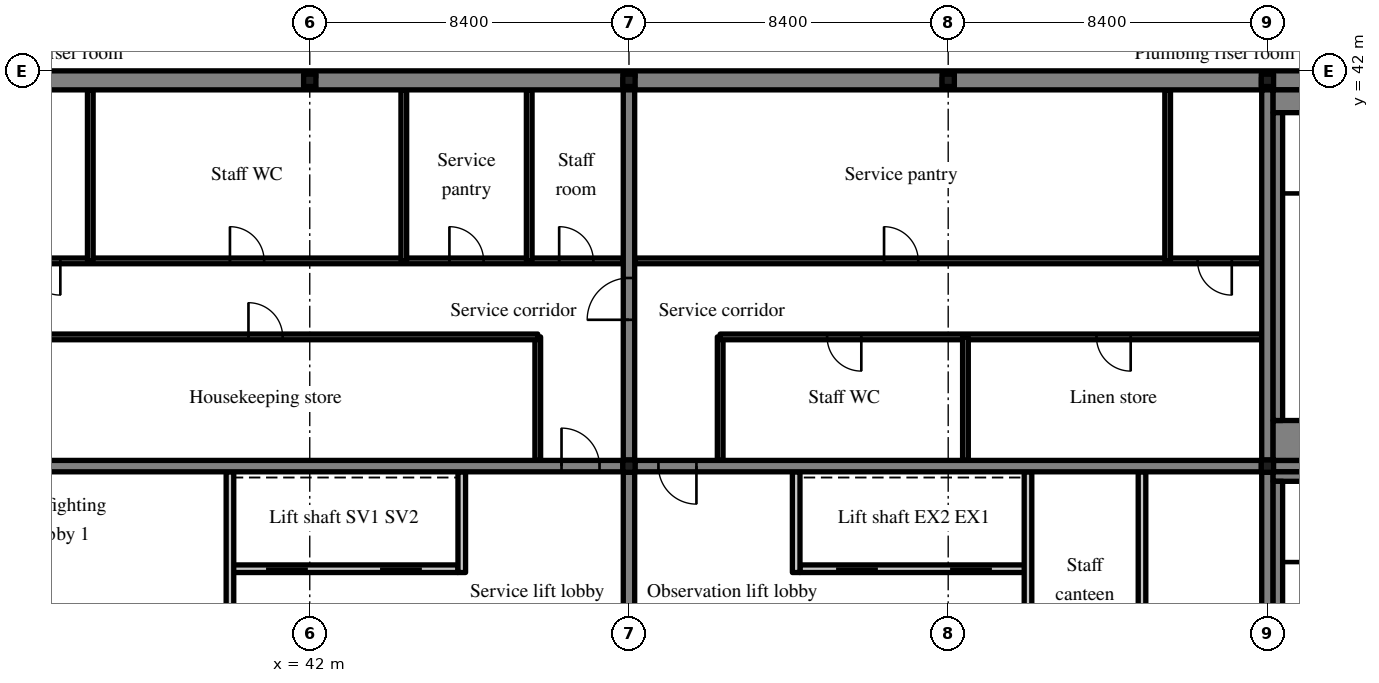
"""IFC4 building model, lengths in metres.
Left out: names, types, materials, properties, quantities, classifications, styles, units other than length and angle.
Written with IfcOpenShell. Run it as: python <this file> out.ifc"""

import sys

from ifc_helpers import new_model, si_unit, direction, frame, frame_2d, origin, origin_2d, place, context, subcontext, project, spatial, rectangle, hollow_circle, extrude, source, transform, mapped, element, fill, save


model = new_model("IFC4")
c1 = context("Model", 3, precision=1e-05, world=origin(), true_north=direction((0.0, 1.0)))
c2 = subcontext(c1, "Body", "Model", "MODEL_VIEW")
j1 = project(units=[si_unit("LENGTHUNIT", "METRE"), si_unit("PLANEANGLEUNIT", "RADIAN")], contexts=[c1])
p1 = place(None, origin())
s1 = spatial("IfcSite", under=j1, at=p1, CompositionType="ELEMENT")
p2 = place(p1, origin())
s2 = spatial("IfcBuilding", under=s1, at=p2, CompositionType="ELEMENT")
p3 = place(p2, frame((0.0, 0.0, 329.7)))
s3 = spatial("IfcBuildingStorey", under=s2, at=p3, CompositionType="ELEMENT", Elevation=329.7)
m1 = source(origin(), c2, "Body", "SweptSolid", [
    extrude(rectangle(XDim=50.4, YDim=0.5, at=frame_2d((25.2, 0.0))), origin(), (0.0, 0.0, 1.0), 4.72),
])
p4 = place(p3, frame((25.2, 41.75, 0.0), z_axis=(0.0, 0.0, 1.0), x_axis=(1.0, 0.0, 0.0)))
e1 = element("IfcWall", 1, at=p4, inside=s3, PredefinedType="SHEAR", context=c2, shape_type="MappedRepresentation", body=[
    mapped(m1, transform((0.0, 0.0, 0.0), scale=1.0)),
])
m2 = source(origin(), c2, "Body", "SweptSolid", [
    extrude(rectangle(XDim=19.0, YDim=0.3, at=frame_2d((9.5, 0.0))), origin(), (0.0, 0.0, 1.0), 4.72),
])
p5 = place(p3, frame((50.4, 22.5, 0.0), z_axis=(0.0, 0.0, 1.0), x_axis=(0.0, 1.0, 0.0)))
e2 = element("IfcWall", 2, at=p5, inside=s3, PredefinedType="SHEAR", context=c2, shape_type="MappedRepresentation", body=[
    mapped(m2, transform((0.0, 0.0, 0.0), scale=1.0)),
])
m3 = source(origin(), c2, "Body", "SweptSolid", [
    extrude(rectangle(XDim=1.1, YDim=2.1, at=frame_2d((0.55, 1.05))), frame((0.0, 0.16, 0.0), z_axis=(0.0, -1.0, 0.0), x_axis=(1.0, 0.0, 0.0)), (0.0, 0.0, 1.0), 0.32),
])
p6 = place(p5, frame((12.95, 0.0, 0.0)))
e3 = element("IfcOpeningElement", 3, at=p6, cuts=e2, PredefinedType="OPENING", context=c2, shape_type="MappedRepresentation", body=[
    mapped(m3, transform((0.0, 0.0, 0.0), scale=1.0)),
])
p7 = place(p3, frame((67.2, 22.5, 0.0), z_axis=(0.0, 0.0, 1.0), x_axis=(0.0, 1.0, 0.0)))
e4 = element("IfcWall", 4, at=p7, inside=s3, PredefinedType="SHEAR", context=c2, shape_type="MappedRepresentation", body=[
    mapped(m2, transform((0.0, 0.0, 0.0), scale=1.0)),
])
m4 = source(origin(), c2, "Body", "SweptSolid", [
    extrude(rectangle(XDim=16.5, YDim=0.3, at=frame_2d((8.25, 0.0))), origin(), (0.0, 0.0, 1.0), 4.72),
])
p8 = place(p3, frame((33.75, 31.6, 0.0), z_axis=(0.0, 0.0, 1.0), x_axis=(1.0, 0.0, 0.0)))
e5 = element("IfcWall", 5, at=p8, inside=s3, PredefinedType="SHEAR", context=c2, shape_type="MappedRepresentation", body=[
    mapped(m4, transform((0.0, 0.0, 0.0), scale=1.0)),
])
m5 = source(origin(), c2, "Body", "SweptSolid", [
    extrude(rectangle(XDim=1.0, YDim=2.1, at=frame_2d((0.5, 1.05))), frame((0.0, 0.16, 0.0), z_axis=(0.0, -1.0, 0.0), x_axis=(1.0, 0.0, 0.0)), (0.0, 0.0, 1.0), 0.32),
])
p9 = place(p8, frame((14.875, 0.0, 0.0)))
e6 = element("IfcOpeningElement", 6, at=p9, cuts=e5, PredefinedType="OPENING", context=c2, shape_type="MappedRepresentation", body=[
    mapped(m5, transform((0.0, 0.0, 0.0), scale=1.0)),
])
p10 = place(p3, frame((50.55, 31.6, 0.0), z_axis=(0.0, 0.0, 1.0), x_axis=(1.0, 0.0, 0.0)))
e7 = element("IfcWall", 7, at=p10, inside=s3, PredefinedType="SHEAR", context=c2, shape_type="MappedRepresentation", body=[
    mapped(m4, transform((0.0, 0.0, 0.0), scale=1.0)),
])
p11 = place(p10, frame((0.625, 0.0, 0.0)))
e8 = element("IfcOpeningElement", 8, at=p11, cuts=e7, PredefinedType="OPENING", context=c2, shape_type="MappedRepresentation", body=[
    mapped(m5, transform((0.0, 0.0, 0.0), scale=1.0)),
])
m6 = source(origin(), c2, "Body", "SweptSolid", [
    extrude(rectangle(XDim=7.75, YDim=0.3, at=frame_2d((3.875, 0.0))), origin(), (0.0, 0.0, 1.0), 4.72),
])
p12 = place(p3, frame((67.35, 31.6, 0.0), z_axis=(0.0, 0.0, 1.0), x_axis=(1.0, 0.0, 0.0)))
e9 = element("IfcWall", 9, at=p12, inside=s3, PredefinedType="SHEAR", context=c2, shape_type="MappedRepresentation", body=[
    mapped(m6, transform((0.0, 0.0, 0.0), scale=1.0)),
])
p13 = place(p12, frame((5.875, 0.0, 0.0)))
e10 = element("IfcOpeningElement", 10, at=p13, cuts=e9, PredefinedType="OPENING", context=c2, shape_type="MappedRepresentation", body=[
    mapped(m3, transform((0.0, 0.0, 0.0), scale=1.0)),
])
m7 = source(origin(), c2, "Body", "SweptSolid", [
    extrude(hollow_circle(Radius=0.162, WallThickness=0.012, at=origin_2d()), origin(), (0.0, 0.0, 1.0), 4.4),
])
for number, where, z_axis, x_axis in (
    (11, (42.0, 41.75, 5.0), (0.0, 0.0, 1.0), (1.0, 0.0, 0.0)),
    (12, (50.4, 41.75, 5.0), (0.0, 0.0, 1.0), (1.0, 0.0, 0.0)),
    (13, (58.8, 41.75, 5.0), (0.0, 0.0, 1.0), (1.0, 0.0, 0.0)),
    (14, (67.2, 41.75, 5.0), (0.0, 0.0, 1.0), (1.0, 0.0, 0.0)),
    (15, (50.4, 31.6, 5.0), (0.0, 0.0, 1.0), (1.0, 0.0, 0.0)),
    (16, (67.2, 31.6, 5.0), (0.0, 0.0, 1.0), (1.0, 0.0, 0.0)),
):
    element("IfcColumn", number, at=place(p3, frame(where, z_axis=z_axis, x_axis=x_axis)), inside=s3, PredefinedType="COLUMN", context=c2, shape_type="MappedRepresentation", body=[
        mapped(m7, transform((0.0, 0.0, 0.0), scale=1.0)),
    ])
m8 = source(origin(), c2, "Body", "SweptSolid", [
    extrude(rectangle(XDim=6.0, YDim=0.2, at=frame_2d((3.0, 0.0))), origin(), (0.0, 0.0, 1.0), 4.72),
])
p14 = place(p3, frame((39.9, 28.9, 0.0), z_axis=(0.0, 0.0, 1.0), x_axis=(1.0, 0.0, 0.0)))
e17 = element("IfcWall", 17, at=p14, inside=s3, PredefinedType="SOLIDWALL", context=c2, shape_type="MappedRepresentation", body=[
    mapped(m8, transform((0.0, 0.0, 0.0), scale=1.0)),
])
m9 = source(origin(), c2, "Body", "SweptSolid", [
    extrude(rectangle(XDim=1.1, YDim=2.1, at=frame_2d((0.55, 1.05))), frame((0.0, 0.11, 0.0), z_axis=(0.0, -1.0, 0.0), x_axis=(1.0, 0.0, 0.0)), (0.0, 0.0, 1.0), 0.22),
])
p15 = place(p14, frame((0.95, 0.0, 0.0)))
e18 = element("IfcOpeningElement", 18, at=p15, cuts=e17, PredefinedType="OPENING", context=c2, shape_type="MappedRepresentation", body=[
    mapped(m9, transform((0.0, 0.0, 0.0), scale=1.0)),
])
p16 = place(p14, frame((3.95, 0.0, 0.0)))
e19 = element("IfcOpeningElement", 19, at=p16, cuts=e17, PredefinedType="OPENING", context=c2, shape_type="MappedRepresentation", body=[
    mapped(m9, transform((0.0, 0.0, 0.0), scale=1.0)),
])
m10 = source(origin(), c2, "Body", "SweptSolid", [
    extrude(rectangle(XDim=8.95, YDim=0.2, at=frame_2d((4.475, 0.0))), origin(), (0.0, 0.0, 1.0), 4.72),
])
p17 = place(p3, frame((39.9, 22.5, 0.0), z_axis=(0.0, 0.0, 1.0), x_axis=(0.0, 1.0, 0.0)))
e20 = element("IfcWall", 20, at=p17, inside=s3, PredefinedType="PARTITIONING", context=c2, shape_type="MappedRepresentation", body=[
    mapped(m10, transform((0.0, 0.0, 0.0), scale=1.0)),
])
m11 = source(origin(), c2, "Body", "SweptSolid", [
    extrude(rectangle(XDim=0.9, YDim=2.1, at=frame_2d((0.45, 1.05))), frame((0.0, 0.11, 0.0), z_axis=(0.0, -1.0, 0.0), x_axis=(1.0, 0.0, 0.0)), (0.0, 0.0, 1.0), 0.22),
])
p18 = place(p17, frame((4.05, 0.0, 0.0)))
e21 = element("IfcOpeningElement", 21, at=p18, cuts=e20, PredefinedType="OPENING", context=c2, shape_type="MappedRepresentation", body=[
    mapped(m11, transform((0.0, 0.0, 0.0), scale=1.0)),
])
m12 = source(origin(), c2, "Body", "SweptSolid", [
    extrude(rectangle(XDim=2.65, YDim=0.2, at=frame_2d((1.325, 0.0))), origin(), (0.0, 0.0, 1.0), 4.72),
])
p19 = place(p3, frame((46.0, 28.8, 0.0), z_axis=(0.0, 0.0, 1.0), x_axis=(0.0, 1.0, 0.0)))
e22 = element("IfcWall", 22, at=p19, inside=s3, PredefinedType="SOLIDWALL", context=c2, shape_type="MappedRepresentation", body=[
    mapped(m12, transform((0.0, 0.0, 0.0), scale=1.0)),
])
m13 = source(origin(), c2, "Body", "SweptSolid", [
    extrude(rectangle(XDim=3.25, YDim=0.15, at=frame_2d((1.625, 0.0))), origin(), (0.0, 0.0, 1.0), 4.72),
])
p20 = place(p3, frame((48.0, 31.75, 0.0), z_axis=(0.0, 0.0, 1.0), x_axis=(0.0, 1.0, 0.0)))
e23 = element("IfcWall", 23, at=p20, inside=s3, PredefinedType="PARTITIONING", context=c2, shape_type="MappedRepresentation", body=[
    mapped(m13, transform((0.0, 0.0, 0.0), scale=1.0)),
])
m14 = source(origin(), c2, "Body", "SweptSolid", [
    extrude(rectangle(XDim=14.25, YDim=0.15, at=frame_2d((7.125, 0.0))), origin(), (0.0, 0.0, 1.0), 4.72),
])
p21 = place(p3, frame((33.75, 35.0, 0.0), z_axis=(0.0, 0.0, 1.0), x_axis=(1.0, 0.0, 0.0)))
e24 = element("IfcWall", 24, at=p21, inside=s3, PredefinedType="PARTITIONING", context=c2, shape_type="MappedRepresentation", body=[
    mapped(m14, transform((0.0, 0.0, 0.0), scale=1.0)),
])
m15 = source(origin(), c2, "Body", "SweptSolid", [
    extrude(rectangle(XDim=0.9, YDim=2.1, at=frame_2d((0.45, 1.05))), frame((0.0, 0.085, 0.0), z_axis=(0.0, -1.0, 0.0), x_axis=(1.0, 0.0, 0.0)), (0.0, 0.0, 1.0), 0.17),
])
p22 = place(p21, frame((6.637, 0.0, 0.0)))
e25 = element("IfcOpeningElement", 25, at=p22, cuts=e24, PredefinedType="OPENING", context=c2, shape_type="MappedRepresentation", body=[
    mapped(m15, transform((0.0, 0.0, 0.0), scale=1.0)),
])
m16 = source(origin(), c2, "Body", "SweptSolid", [
    extrude(rectangle(XDim=16.5, YDim=0.15, at=frame_2d((8.25, 0.0))), origin(), (0.0, 0.0, 1.0), 4.72),
])
p23 = place(p3, frame((33.75, 37.0, 0.0), z_axis=(0.0, 0.0, 1.0), x_axis=(1.0, 0.0, 0.0)))
e26 = element("IfcWall", 26, at=p23, inside=s3, PredefinedType="PARTITIONING", context=c2, shape_type="MappedRepresentation", body=[
    mapped(m16, transform((0.0, 0.0, 0.0), scale=1.0)),
])
p24 = place(p23, frame((0.787, 0.0, 0.0)))
e27 = element("IfcOpeningElement", 27, at=p24, cuts=e26, PredefinedType="OPENING", context=c2, shape_type="MappedRepresentation", body=[
    mapped(m15, transform((0.0, 0.0, 0.0), scale=1.0)),
])
p25 = place(p23, frame((6.15, 0.0, 0.0)))
e28 = element("IfcOpeningElement", 28, at=p25, cuts=e26, PredefinedType="OPENING", context=c2, shape_type="MappedRepresentation", body=[
    mapped(m15, transform((0.0, 0.0, 0.0), scale=1.0)),
])
p26 = place(p23, frame((11.925, 0.0, 0.0)))
e29 = element("IfcOpeningElement", 29, at=p26, cuts=e26, PredefinedType="OPENING", context=c2, shape_type="MappedRepresentation", body=[
    mapped(m15, transform((0.0, 0.0, 0.0), scale=1.0)),
])
p27 = place(p23, frame((14.813, 0.0, 0.0)))
e30 = element("IfcOpeningElement", 30, at=p27, cuts=e26, PredefinedType="OPENING", context=c2, shape_type="MappedRepresentation", body=[
    mapped(m15, transform((0.0, 0.0, 0.0), scale=1.0)),
])
m17 = source(origin(), c2, "Body", "SweptSolid", [
    extrude(rectangle(XDim=4.5, YDim=0.15, at=frame_2d((2.25, 0.0))), origin(), (0.0, 0.0, 1.0), 4.72),
])
for number, where, z_axis, x_axis in (
    (31, (36.225, 37.0, 0.0), (0.0, 0.0, 1.0), (0.0, 1.0, 0.0)),
    (32, (44.475, 37.0, 0.0), (0.0, 0.0, 1.0), (0.0, 1.0, 0.0)),
    (33, (47.775, 37.0, 0.0), (0.0, 0.0, 1.0), (0.0, 1.0, 0.0)),
):
    element("IfcWall", number, at=place(p3, frame(where, z_axis=z_axis, x_axis=x_axis)), inside=s3, PredefinedType="PARTITIONING", context=c2, shape_type="MappedRepresentation", body=[
        mapped(m17, transform((0.0, 0.0, 0.0), scale=1.0)),
    ])
p28 = place(p3, frame((60.9, 28.9, 0.0), z_axis=(0.0, 0.0, 1.0), x_axis=(-1.0, 0.0, 0.0)))
e34 = element("IfcWall", 34, at=p28, inside=s3, PredefinedType="SOLIDWALL", context=c2, shape_type="MappedRepresentation", body=[
    mapped(m8, transform((0.0, 0.0, 0.0), scale=1.0)),
])
p29 = place(p28, frame((0.95, 0.0, 0.0)))
e35 = element("IfcOpeningElement", 35, at=p29, cuts=e34, PredefinedType="OPENING", context=c2, shape_type="MappedRepresentation", body=[
    mapped(m9, transform((0.0, 0.0, 0.0), scale=1.0)),
])
p30 = place(p28, frame((3.95, 0.0, 0.0)))
e36 = element("IfcOpeningElement", 36, at=p30, cuts=e34, PredefinedType="OPENING", context=c2, shape_type="MappedRepresentation", body=[
    mapped(m9, transform((0.0, 0.0, 0.0), scale=1.0)),
])
p31 = place(p3, frame((60.9, 22.5, 0.0), z_axis=(0.0, 0.0, 1.0), x_axis=(0.0, 1.0, 0.0)))
e37 = element("IfcWall", 37, at=p31, inside=s3, PredefinedType="PARTITIONING", context=c2, shape_type="MappedRepresentation", body=[
    mapped(m10, transform((0.0, 0.0, 0.0), scale=1.0)),
])
p32 = place(p31, frame((4.05, 0.0, 0.0)))
e38 = element("IfcOpeningElement", 38, at=p32, cuts=e37, PredefinedType="OPENING", context=c2, shape_type="MappedRepresentation", body=[
    mapped(m11, transform((0.0, 0.0, 0.0), scale=1.0)),
])
p33 = place(p3, frame((54.8, 28.8, 0.0), z_axis=(0.0, 0.0, 1.0), x_axis=(0.0, 1.0, 0.0)))
e39 = element("IfcWall", 39, at=p33, inside=s3, PredefinedType="SOLIDWALL", context=c2, shape_type="MappedRepresentation", body=[
    mapped(m12, transform((0.0, 0.0, 0.0), scale=1.0)),
])
p34 = place(p3, frame((63.9, 22.5, 0.0), z_axis=(0.0, 0.0, 1.0), x_axis=(0.0, 1.0, 0.0)))
e40 = element("IfcWall", 40, at=p34, inside=s3, PredefinedType="PARTITIONING", context=c2, shape_type="MappedRepresentation", body=[
    mapped(m10, transform((0.0, 0.0, 0.0), scale=1.0)),
])
p35 = place(p3, frame((52.8, 31.75, 0.0), z_axis=(0.0, 0.0, 1.0), x_axis=(0.0, 1.0, 0.0)))
e41 = element("IfcWall", 41, at=p35, inside=s3, PredefinedType="PARTITIONING", context=c2, shape_type="MappedRepresentation", body=[
    mapped(m13, transform((0.0, 0.0, 0.0), scale=1.0)),
])
p36 = place(p3, frame((67.05, 35.0, 0.0), z_axis=(0.0, 0.0, 1.0), x_axis=(-1.0, 0.0, 0.0)))
e42 = element("IfcWall", 42, at=p36, inside=s3, PredefinedType="PARTITIONING", context=c2, shape_type="MappedRepresentation", body=[
    mapped(m14, transform((0.0, 0.0, 0.0), scale=1.0)),
])
p37 = place(p36, frame((3.448, 0.0, 0.0)))
e43 = element("IfcOpeningElement", 43, at=p37, cuts=e42, PredefinedType="OPENING", context=c2, shape_type="MappedRepresentation", body=[
    mapped(m15, transform((0.0, 0.0, 0.0), scale=1.0)),
])
p38 = place(p36, frame((10.536, 0.0, 0.0)))
e44 = element("IfcOpeningElement", 44, at=p38, cuts=e42, PredefinedType="OPENING", context=c2, shape_type="MappedRepresentation", body=[
    mapped(m15, transform((0.0, 0.0, 0.0), scale=1.0)),
])
p39 = place(p3, frame((67.05, 37.0, 0.0), z_axis=(0.0, 0.0, 1.0), x_axis=(-1.0, 0.0, 0.0)))
e45 = element("IfcWall", 45, at=p39, inside=s3, PredefinedType="PARTITIONING", context=c2, shape_type="MappedRepresentation", body=[
    mapped(m16, transform((0.0, 0.0, 0.0), scale=1.0)),
])
p40 = place(p39, frame((0.788, 0.0, 0.0)))
e46 = element("IfcOpeningElement", 46, at=p40, cuts=e45, PredefinedType="OPENING", context=c2, shape_type="MappedRepresentation", body=[
    mapped(m15, transform((0.0, 0.0, 0.0), scale=1.0)),
])
p41 = place(p39, frame((9.038, 0.0, 0.0)))
e47 = element("IfcOpeningElement", 47, at=p41, cuts=e45, PredefinedType="OPENING", context=c2, shape_type="MappedRepresentation", body=[
    mapped(m15, transform((0.0, 0.0, 0.0), scale=1.0)),
])
p42 = place(p3, frame((59.254, 31.75, 0.0), z_axis=(0.0, 0.0, 1.0), x_axis=(0.0, 1.0, 0.0)))
e48 = element("IfcWall", 48, at=p42, inside=s3, PredefinedType="PARTITIONING", context=c2, shape_type="MappedRepresentation", body=[
    mapped(m13, transform((0.0, 0.0, 0.0), scale=1.0)),
])
p43 = place(p3, frame((64.575, 37.0, 0.0), z_axis=(0.0, 0.0, 1.0), x_axis=(0.0, 1.0, 0.0)))
e49 = element("IfcWall", 49, at=p43, inside=s3, PredefinedType="PARTITIONING", context=c2, shape_type="MappedRepresentation", body=[
    mapped(m17, transform((0.0, 0.0, 0.0), scale=1.0)),
])
m18 = source(origin(), c2, "Body", "SweptSolid", [
    extrude(rectangle(XDim=4.9, YDim=0.25, at=frame_2d((2.45, 0.0))), origin(), (0.0, 0.0, 1.0), 4.72),
])
p44 = place(p3, frame((67.35, 31.325, 0.0), z_axis=(0.0, 0.0, 1.0), x_axis=(1.0, 0.0, 0.0)))
e50 = element("IfcWall", 50, at=p44, inside=s3, PredefinedType="SOLIDWALL", context=c2, shape_type="MappedRepresentation", body=[
    mapped(m18, transform((0.0, 0.0, 0.0), scale=1.0)),
])
m19 = source(origin(), c2, "Body", "SweptSolid", [
    extrude(rectangle(XDim=8.1, YDim=0.25, at=frame_2d((4.05, 0.0))), origin(), (0.0, 0.0, 1.0), 4.72),
])
p45 = place(p3, frame((67.475, 23.1, 0.0), z_axis=(0.0, 0.0, 1.0), x_axis=(0.0, 1.0, 0.0)))
e51 = element("IfcWall", 51, at=p45, inside=s3, PredefinedType="SOLIDWALL", context=c2, shape_type="MappedRepresentation", body=[
    mapped(m19, transform((0.0, 0.0, 0.0), scale=1.0)),
])
m20 = source(origin(), c2, "Body", "SweptSolid", [
    extrude(rectangle(XDim=4.9, YDim=0.6, at=frame_2d((2.45, 0.0))), origin(), (0.0, 0.0, 1.0), 4.72),
])
p46 = place(p3, frame((67.35, 41.2, 0.0), z_axis=(0.0, 0.0, 1.0), x_axis=(1.0, 0.0, 0.0)))
e52 = element("IfcWall", 52, at=p46, inside=s3, PredefinedType="SOLIDWALL", context=c2, shape_type="MappedRepresentation", body=[
    mapped(m20, transform((0.0, 0.0, 0.0), scale=1.0)),
])
m21 = source(origin(), c2, "Body", "SweptSolid", [
    extrude(rectangle(XDim=4.9, YDim=1.05, at=frame_2d((2.45, 0.0))), origin(), (0.0, 0.0, 1.0), 4.72),
])
p47 = place(p3, frame((67.35, 32.275, 0.0), z_axis=(0.0, 0.0, 1.0), x_axis=(1.0, 0.0, 0.0)))
e53 = element("IfcWall", 53, at=p47, inside=s3, PredefinedType="SOLIDWALL", context=c2, shape_type="MappedRepresentation", body=[
    mapped(m21, transform((0.0, 0.0, 0.0), scale=1.0)),
])
p48 = place(p3, frame((67.475, 32.8, 0.0), z_axis=(0.0, 0.0, 1.0), x_axis=(0.0, 1.0, 0.0)))
e54 = element("IfcWall", 54, at=p48, inside=s3, PredefinedType="SOLIDWALL", context=c2, shape_type="MappedRepresentation", body=[
    mapped(m19, transform((0.0, 0.0, 0.0), scale=1.0)),
])
m22 = source(origin(), c2, "Body", "SweptSolid", [
    extrude(rectangle(XDim=1.0, YDim=2.1, at=frame_2d((0.5, 1.05))), frame((0.0, 0.025, 0.0), z_axis=(0.0, -1.0, 0.0), x_axis=(1.0, 0.0, 0.0)), (0.0, 0.0, 1.0), 0.05),
])
p49 = place(p9, origin())
e55 = element("IfcDoor", 55, at=p49, inside=s3, OperationType="SINGLE_SWING_LEFT", PredefinedType="DOOR", context=c2, shape_type="MappedRepresentation", body=[
    mapped(m22, transform((0.0, 0.0, 0.0), scale=1.0)),
])
fill(e6, e55)
m23 = source(origin(), c2, "Body", "SweptSolid", [
    extrude(rectangle(XDim=1.1, YDim=2.1, at=frame_2d((0.55, 1.05))), frame((0.0, 0.025, 0.0), z_axis=(0.0, -1.0, 0.0), x_axis=(1.0, 0.0, 0.0)), (0.0, 0.0, 1.0), 0.05),
])
p50 = place(p15, origin())
e56 = element("IfcDoor", 56, at=p50, inside=s3, OperationType="SLIDING_TO_LEFT", PredefinedType="DOOR", context=c2, shape_type="MappedRepresentation", body=[
    mapped(m23, transform((0.0, 0.0, 0.0), scale=1.0)),
])
fill(e18, e56)
p51 = place(p16, origin())
e57 = element("IfcDoor", 57, at=p51, inside=s3, OperationType="SLIDING_TO_RIGHT", PredefinedType="DOOR", context=c2, shape_type="MappedRepresentation", body=[
    mapped(m23, transform((0.0, 0.0, 0.0), scale=1.0)),
])
fill(e19, e57)
m24 = source(origin(), c2, "Body", "SweptSolid", [
    extrude(rectangle(XDim=0.9, YDim=2.1, at=frame_2d((0.45, 1.05))), frame((0.0, 0.025, 0.0), z_axis=(0.0, -1.0, 0.0), x_axis=(1.0, 0.0, 0.0)), (0.0, 0.0, 1.0), 0.05),
])
p52 = place(p22, origin())
e58 = element("IfcDoor", 58, at=p52, inside=s3, OperationType="SINGLE_SWING_LEFT", PredefinedType="DOOR", context=c2, shape_type="MappedRepresentation", body=[
    mapped(m24, transform((0.0, 0.0, 0.0), scale=1.0)),
])
fill(e25, e58)
p53 = place(p24, origin())
e59 = element("IfcDoor", 59, at=p53, inside=s3, OperationType="SINGLE_SWING_RIGHT", PredefinedType="DOOR", context=c2, shape_type="MappedRepresentation", body=[
    mapped(m24, transform((0.0, 0.0, 0.0), scale=1.0)),
])
fill(e27, e59)
p54 = place(p25, origin())
e60 = element("IfcDoor", 60, at=p54, inside=s3, OperationType="SINGLE_SWING_LEFT", PredefinedType="DOOR", context=c2, shape_type="MappedRepresentation", body=[
    mapped(m24, transform((0.0, 0.0, 0.0), scale=1.0)),
])
fill(e28, e60)
p55 = place(p26, origin())
e61 = element("IfcDoor", 61, at=p55, inside=s3, OperationType="SINGLE_SWING_LEFT", PredefinedType="DOOR", context=c2, shape_type="MappedRepresentation", body=[
    mapped(m24, transform((0.0, 0.0, 0.0), scale=1.0)),
])
fill(e29, e61)
p56 = place(p27, origin())
e62 = element("IfcDoor", 62, at=p56, inside=s3, OperationType="SINGLE_SWING_LEFT", PredefinedType="DOOR", context=c2, shape_type="MappedRepresentation", body=[
    mapped(m24, transform((0.0, 0.0, 0.0), scale=1.0)),
])
fill(e30, e62)
p57 = place(p11, origin())
e63 = element("IfcDoor", 63, at=p57, inside=s3, OperationType="SINGLE_SWING_RIGHT", PredefinedType="DOOR", context=c2, shape_type="MappedRepresentation", body=[
    mapped(m22, transform((0.0, 0.0, 0.0), scale=1.0)),
])
fill(e8, e63)
p58 = place(p29, origin())
e64 = element("IfcDoor", 64, at=p58, inside=s3, OperationType="SLIDING_TO_RIGHT", PredefinedType="DOOR", context=c2, shape_type="MappedRepresentation", body=[
    mapped(m23, transform((0.0, 0.0, 0.0), scale=1.0)),
])
fill(e35, e64)
p59 = place(p30, origin())
e65 = element("IfcDoor", 65, at=p59, inside=s3, OperationType="SLIDING_TO_LEFT", PredefinedType="DOOR", context=c2, shape_type="MappedRepresentation", body=[
    mapped(m23, transform((0.0, 0.0, 0.0), scale=1.0)),
])
fill(e36, e65)
p60 = place(p37, origin())
e66 = element("IfcDoor", 66, at=p60, inside=s3, OperationType="SINGLE_SWING_LEFT", PredefinedType="DOOR", context=c2, shape_type="MappedRepresentation", body=[
    mapped(m24, transform((0.0, 0.0, 0.0), scale=1.0)),
])
fill(e43, e66)
p61 = place(p38, origin())
e67 = element("IfcDoor", 67, at=p61, inside=s3, OperationType="SINGLE_SWING_LEFT", PredefinedType="DOOR", context=c2, shape_type="MappedRepresentation", body=[
    mapped(m24, transform((0.0, 0.0, 0.0), scale=1.0)),
])
fill(e44, e67)
p62 = place(p40, origin())
e68 = element("IfcDoor", 68, at=p62, inside=s3, OperationType="SINGLE_SWING_LEFT", PredefinedType="DOOR", context=c2, shape_type="MappedRepresentation", body=[
    mapped(m24, transform((0.0, 0.0, 0.0), scale=1.0)),
])
fill(e46, e68)
p63 = place(p41, origin())
e69 = element("IfcDoor", 69, at=p63, inside=s3, OperationType="SINGLE_SWING_RIGHT", PredefinedType="DOOR", context=c2, shape_type="MappedRepresentation", body=[
    mapped(m24, transform((0.0, 0.0, 0.0), scale=1.0)),
])
fill(e47, e69)
p64 = place(p6, origin())
e70 = element("IfcDoor", 70, at=p64, inside=s3, OperationType="SINGLE_SWING_LEFT", PredefinedType="DOOR", context=c2, shape_type="MappedRepresentation", body=[
    mapped(m23, transform((0.0, 0.0, 0.0), scale=1.0)),
])
fill(e3, e70)
save(model, sys.argv[1])
